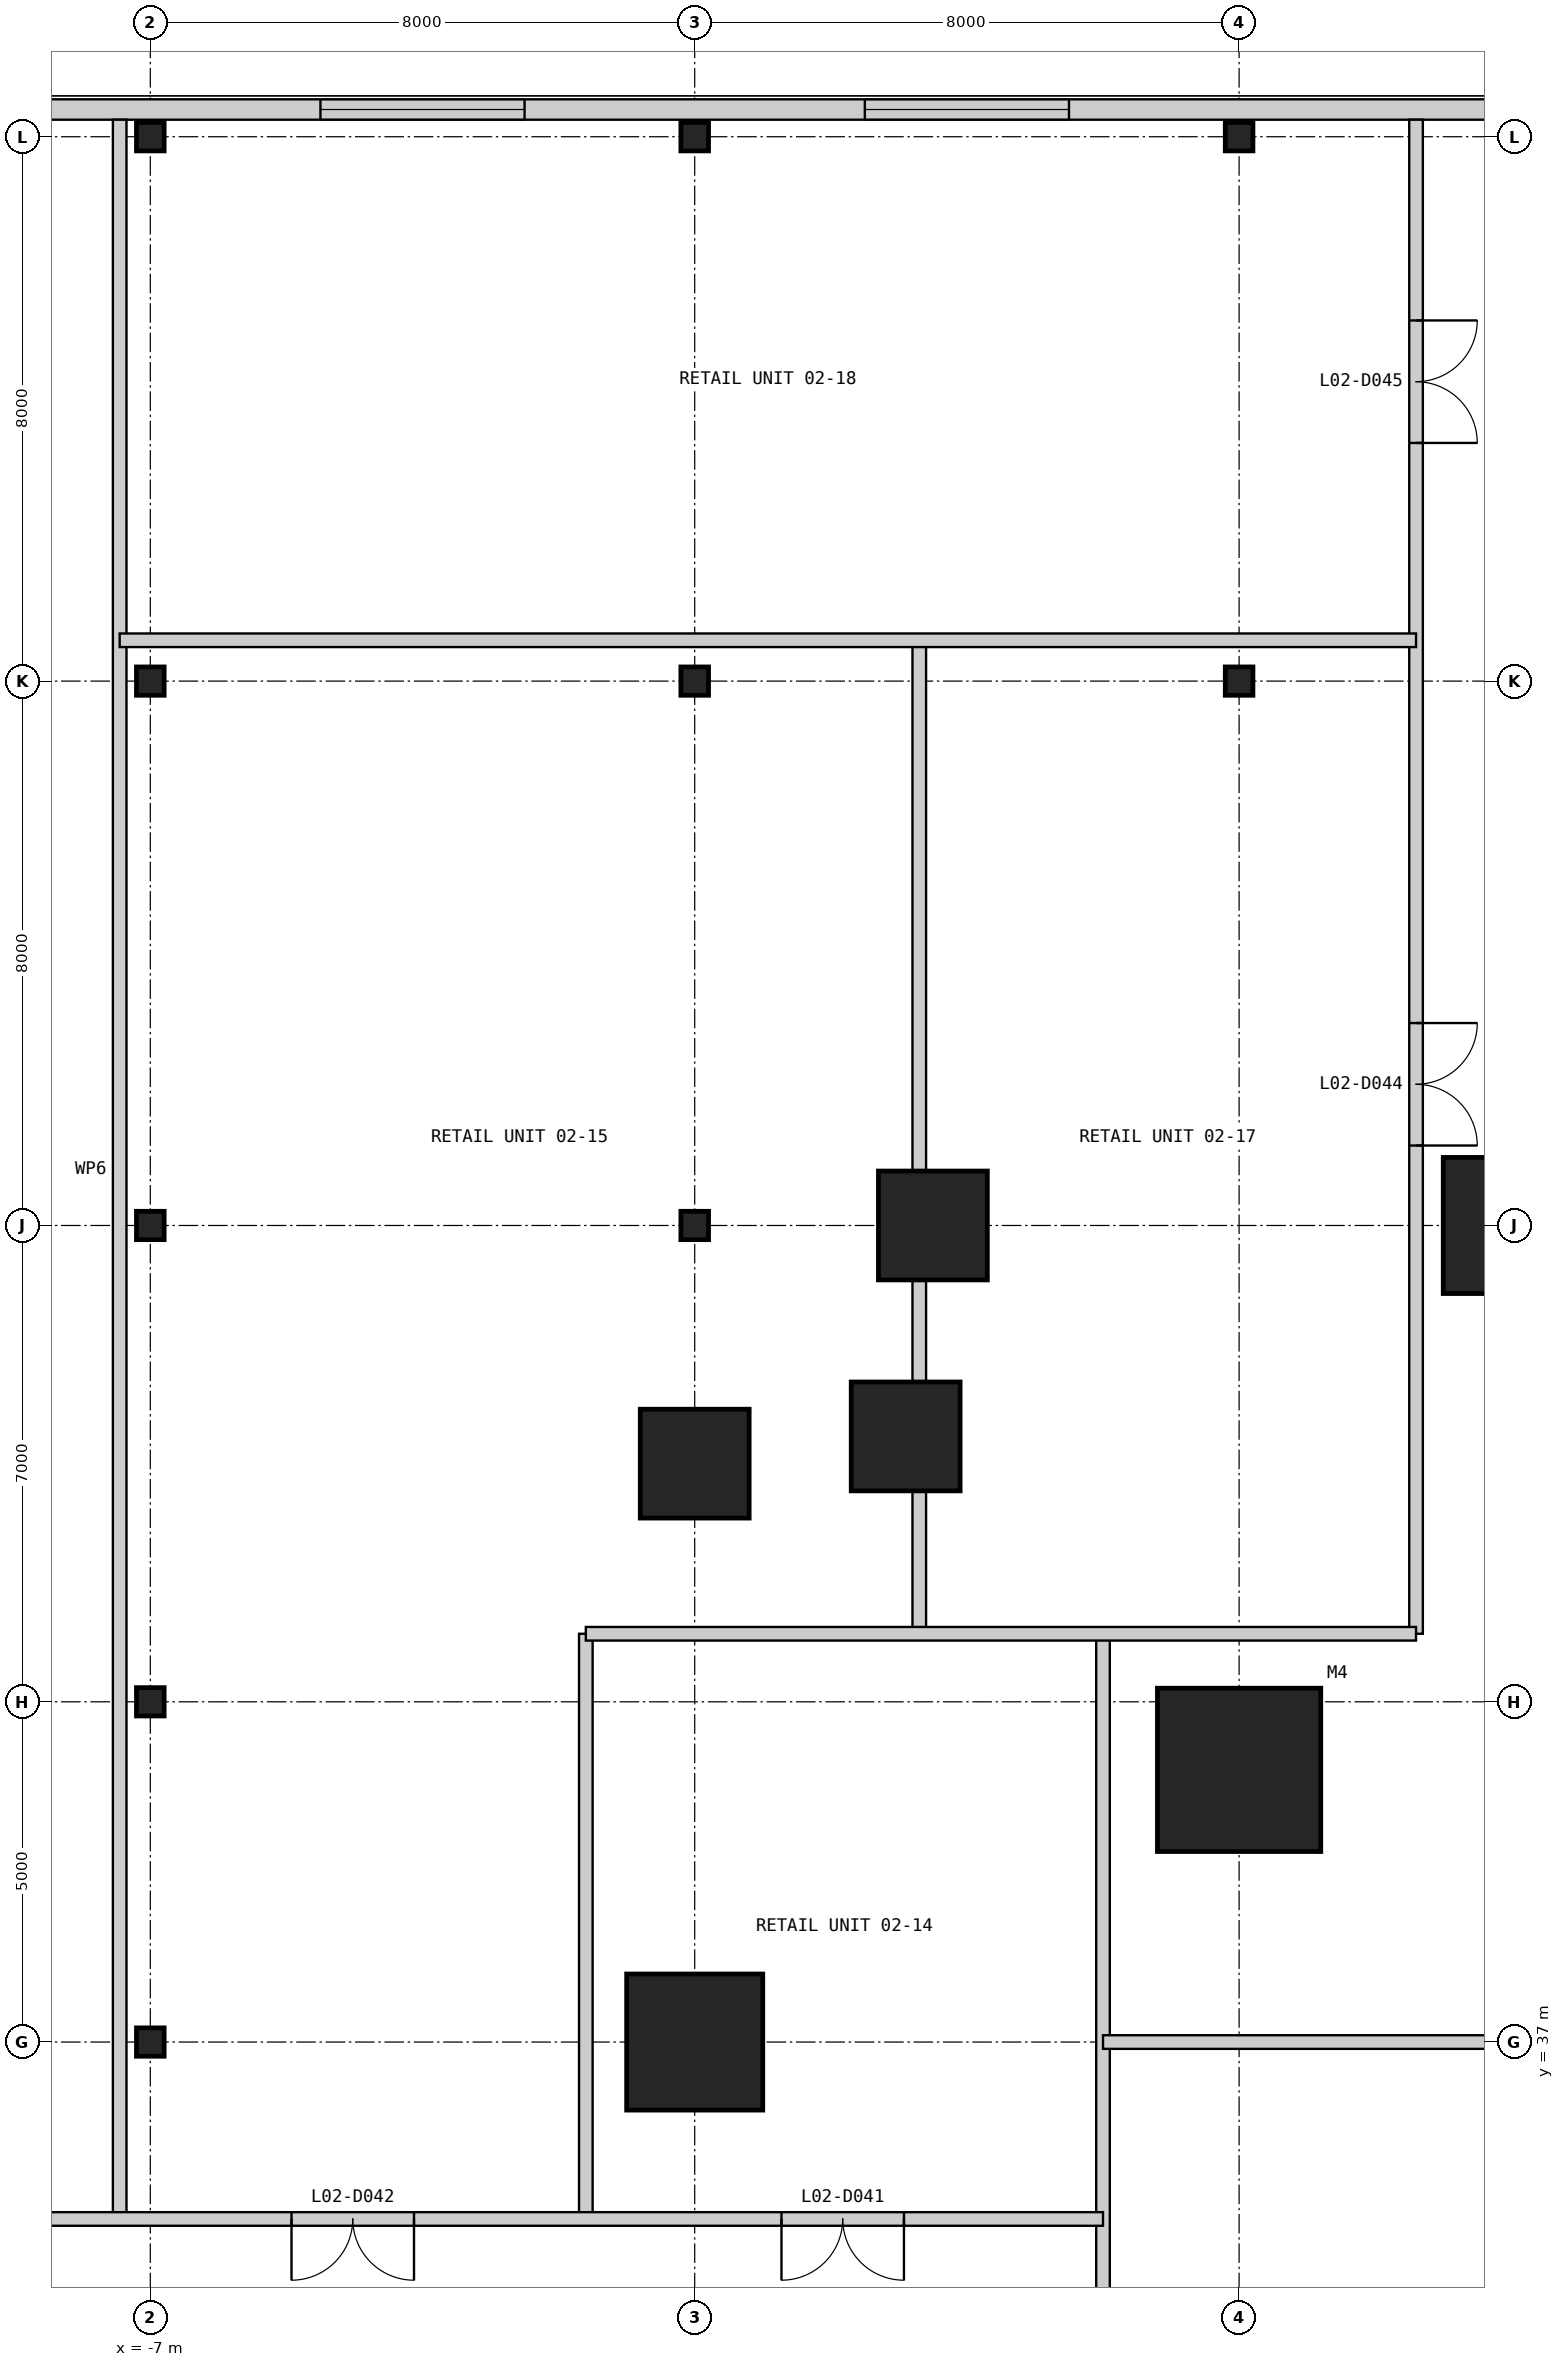
"""IFC4 building model, lengths in metres.
Left out: names, types, materials, properties, quantities, classifications, styles, units other than length and angle.
Written with IfcOpenShell. Run it as: python <this file> out.ifc"""

import sys

from ifc_helpers import new_model, si_unit, direction, frame, frame_2d, origin, origin_2d, place, context, subcontext, project, spatial, rectangle, i_section, extrude, element, fill, save


model = new_model("IFC4")
c1 = context("Model", 3, precision=1e-05, world=origin(), true_north=direction((0.0, 1.0)))
c2 = subcontext(c1, "Body", "Model", "MODEL_VIEW")
j1 = project(units=[si_unit("LENGTHUNIT", "METRE"), si_unit("PLANEANGLEUNIT", "RADIAN")], contexts=[c1])
p1 = place(None, origin())
s1 = spatial("IfcSite", under=j1, at=p1, CompositionType="ELEMENT")
p2 = place(p1, origin())
s2 = spatial("IfcBuilding", under=s1, at=p2, CompositionType="ELEMENT")
p3 = place(p2, frame((0.0, 0.0, 11.8)))
s3 = spatial("IfcBuildingStorey", under=s2, at=p3, CompositionType="ELEMENT", Elevation=11.8)
p4 = place(p3, frame((9.0, 41.0, 0.0), z_axis=(0.0, 0.0, 1.0), x_axis=(1.0, 0.0, 0.0)))
e1 = element("IfcColumn", 1, at=p4, inside=s3, PredefinedType="COLUMN", context=c2, shape_type="SweptSolid", body=[
    extrude(rectangle(XDim=2.4, YDim=2.4, at=origin_2d()), origin(), (0.0, 0.0, 1.0), 4.8),
])
p5 = place(p3, frame((13.0, 49.0, 0.0), z_axis=(0.0, 0.0, 1.0), x_axis=(1.0, 0.0, 0.0)))
e2 = element("IfcColumn", 2, at=p5, inside=s3, PredefinedType="COLUMN", context=c2, shape_type="SweptSolid", body=[
    extrude(rectangle(XDim=2.0, YDim=2.0, at=origin_2d()), origin(), (0.0, 0.0, 1.0), 4.8),
])
for number, where, z_axis, x_axis in (
    (3, (4.5, 49.0, 0.0), (0.0, 0.0, 1.0), (1.0, 0.0, 0.0)),
    (4, (4.1, 45.9, 0.0), (0.0, 0.0, 1.0), (1.0, 0.0, 0.0)),
    (5, (1.0, 45.5, 0.0), (0.0, 0.0, 1.0), (1.0, 0.0, 0.0)),
):
    element("IfcColumn", number, at=place(p3, frame(where, z_axis=z_axis, x_axis=x_axis)), inside=s3, PredefinedType="COLUMN", context=c2, shape_type="SweptSolid", body=[
        extrude(rectangle(XDim=1.6, YDim=1.6, at=origin_2d()), origin(), (0.0, 0.0, 1.0), 4.8),
    ])
p6 = place(p3, frame((1.0, 37.0, 0.0), z_axis=(0.0, 0.0, 1.0), x_axis=(1.0, 0.0, 0.0)))
e6 = element("IfcColumn", 6, at=p6, inside=s3, PredefinedType="COLUMN", context=c2, shape_type="SweptSolid", body=[
    extrude(rectangle(XDim=2.0, YDim=2.0, at=origin_2d()), origin(), (0.0, 0.0, 1.0), 4.8),
])
for number, where, z_axis, x_axis in (
    (7, (-7.0, 37.0, 0.0), (0.0, 0.0, 1.0), (1.0, 0.0, 0.0)),
    (8, (-7.0, 42.0, 0.0), (0.0, 0.0, 1.0), (1.0, 0.0, 0.0)),
    (9, (-7.0, 49.0, 0.0), (0.0, 0.0, 1.0), (1.0, 0.0, 0.0)),
    (10, (-7.0, 57.0, 0.0), (0.0, 0.0, 1.0), (1.0, 0.0, 0.0)),
    (11, (-7.0, 65.0, 0.0), (0.0, 0.0, 1.0), (1.0, 0.0, 0.0)),
    (12, (1.0, 49.0, 0.0), (0.0, 0.0, 1.0), (1.0, 0.0, 0.0)),
    (13, (1.0, 57.0, 0.0), (0.0, 0.0, 1.0), (1.0, 0.0, 0.0)),
    (14, (1.0, 65.0, 0.0), (0.0, 0.0, 1.0), (1.0, 0.0, 0.0)),
    (15, (9.0, 57.0, 0.0), (0.0, 0.0, 1.0), (1.0, 0.0, 0.0)),
    (16, (9.0, 65.0, 0.0), (0.0, 0.0, 1.0), (1.0, 0.0, 0.0)),
):
    element("IfcColumn", number, at=place(p3, frame(where, z_axis=z_axis, x_axis=x_axis)), inside=s3, PredefinedType="COLUMN", context=c2, shape_type="SweptSolid", body=[
        extrude(i_section(OverallWidth=0.406, OverallDepth=0.417, WebThickness=0.03, FlangeThickness=0.048, at=origin_2d()), origin(), (0.0, 0.0, 1.0), 4.8),
    ])
p7 = place(p3, frame((57.55, 65.4, 0.0), z_axis=(0.0, 0.0, 1.0), x_axis=(-1.0, 0.0, 0.0)))
e17 = element("IfcWall", 17, at=p7, inside=s3, PredefinedType="SOLIDWALL", context=c2, shape_type="SweptSolid", body=[
    extrude(rectangle(XDim=73.1, YDim=0.3, at=frame_2d((36.55, 0.0))), origin(), (0.0, 0.0, 1.0), 4.5),
])
p8 = place(p7, frame((67.05, 0.0, 0.9)))
e18 = element("IfcOpeningElement", 18, at=p8, cuts=e17, PredefinedType="OPENING", context=c2, shape_type="SweptSolid", body=[
    extrude(rectangle(XDim=3.0, YDim=2.4, at=frame_2d((1.5, 1.2))), frame((0.0, 0.16, 0.0), z_axis=(0.0, -1.0, 0.0), x_axis=(1.0, 0.0, 0.0)), (0.0, 0.0, 1.0), 0.32),
])
p9 = place(p7, frame((59.05, 0.0, 0.9)))
e19 = element("IfcOpeningElement", 19, at=p9, cuts=e17, PredefinedType="OPENING", context=c2, shape_type="SweptSolid", body=[
    extrude(rectangle(XDim=3.0, YDim=2.4, at=frame_2d((1.5, 1.2))), frame((0.0, 0.16, 0.0), z_axis=(0.0, -1.0, 0.0), x_axis=(1.0, 0.0, 0.0)), (0.0, 0.0, 1.0), 0.32),
])
p10 = place(p7, frame((51.05, 0.0, 0.9)))
e20 = element("IfcOpeningElement", 20, at=p10, cuts=e17, PredefinedType="OPENING", context=c2, shape_type="SweptSolid", body=[
    extrude(rectangle(XDim=3.0, YDim=2.4, at=frame_2d((1.5, 1.2))), frame((0.0, 0.16, 0.0), z_axis=(0.0, -1.0, 0.0), x_axis=(1.0, 0.0, 0.0)), (0.0, 0.0, 1.0), 0.32),
])
p11 = place(p7, frame((37.05, 0.0, 0.9)))
e21 = element("IfcOpeningElement", 21, at=p11, cuts=e17, PredefinedType="OPENING", context=c2, shape_type="SweptSolid", body=[
    extrude(rectangle(XDim=3.0, YDim=2.4, at=frame_2d((1.5, 1.2))), frame((0.0, 0.16, 0.0), z_axis=(0.0, -1.0, 0.0), x_axis=(1.0, 0.0, 0.0)), (0.0, 0.0, 1.0), 0.32),
])
p12 = place(p7, frame((25.05, 0.0, 0.9)))
e22 = element("IfcOpeningElement", 22, at=p12, cuts=e17, PredefinedType="OPENING", context=c2, shape_type="SweptSolid", body=[
    extrude(rectangle(XDim=3.0, YDim=2.4, at=frame_2d((1.5, 1.2))), frame((0.0, 0.16, 0.0), z_axis=(0.0, -1.0, 0.0), x_axis=(1.0, 0.0, 0.0)), (0.0, 0.0, 1.0), 0.32),
])
p13 = place(p7, frame((16.55, 0.0, 0.9)))
e23 = element("IfcOpeningElement", 23, at=p13, cuts=e17, PredefinedType="OPENING", context=c2, shape_type="SweptSolid", body=[
    extrude(rectangle(XDim=3.0, YDim=2.4, at=frame_2d((1.5, 1.2))), frame((0.0, 0.16, 0.0), z_axis=(0.0, -1.0, 0.0), x_axis=(1.0, 0.0, 0.0)), (0.0, 0.0, 1.0), 0.32),
])
p14 = place(p7, frame((10.55, 0.0, 0.9)))
e24 = element("IfcOpeningElement", 24, at=p14, cuts=e17, PredefinedType="OPENING", context=c2, shape_type="SweptSolid", body=[
    extrude(rectangle(XDim=3.0, YDim=2.4, at=frame_2d((1.5, 1.2))), frame((0.0, 0.16, 0.0), z_axis=(0.0, -1.0, 0.0), x_axis=(1.0, 0.0, 0.0)), (0.0, 0.0, 1.0), 0.32),
])
p15 = place(p7, frame((3.05, 0.0, 0.9)))
e25 = element("IfcOpeningElement", 25, at=p15, cuts=e17, PredefinedType="OPENING", context=c2, shape_type="SweptSolid", body=[
    extrude(rectangle(XDim=3.0, YDim=2.4, at=frame_2d((1.5, 1.2))), frame((0.0, 0.16, 0.0), z_axis=(0.0, -1.0, 0.0), x_axis=(1.0, 0.0, 0.0)), (0.0, 0.0, 1.0), 0.32),
])
p16 = place(p3, frame((-7.45, 34.4, 0.0), z_axis=(0.0, 0.0, 1.0), x_axis=(0.0, 1.0, 0.0)))
e26 = element("IfcWall", 26, at=p16, inside=s3, PredefinedType="PARTITIONING", context=c2, shape_type="SweptSolid", body=[
    extrude(rectangle(XDim=30.85, YDim=0.2, at=frame_2d((15.425, 0.0))), origin(), (0.0, 0.0, 1.0), 4.5),
])
p17 = place(p3, frame((-0.6, 34.4, 0.0), z_axis=(0.0, 0.0, 1.0), x_axis=(0.0, 1.0, 0.0)))
e27 = element("IfcWall", 27, at=p17, inside=s3, PredefinedType="PARTITIONING", context=c2, shape_type="SweptSolid", body=[
    extrude(rectangle(XDim=8.6, YDim=0.2, at=frame_2d((4.3, 0.0))), origin(), (0.0, 0.0, 1.0), 4.5),
])
p18 = place(p3, frame((4.3, 43.0, 0.0), z_axis=(0.0, 0.0, 1.0), x_axis=(0.0, 1.0, 0.0)))
e28 = element("IfcWall", 28, at=p18, inside=s3, PredefinedType="PARTITIONING", context=c2, shape_type="SweptSolid", body=[
    extrude(rectangle(XDim=2.1, YDim=0.2, at=frame_2d((1.05, 0.0))), origin(), (0.0, 0.0, 1.0), 4.5),
])
p19 = place(p3, frame((4.3, 46.7, 0.0), z_axis=(0.0, 0.0, 1.0), x_axis=(0.0, 1.0, 0.0)))
e29 = element("IfcWall", 29, at=p19, inside=s3, PredefinedType="PARTITIONING", context=c2, shape_type="SweptSolid", body=[
    extrude(rectangle(XDim=1.5, YDim=0.2, at=frame_2d((0.75, 0.0))), origin(), (0.0, 0.0, 1.0), 3.65),
])
p20 = place(p3, frame((4.3, 49.8, 0.0), z_axis=(0.0, 0.0, 1.0), x_axis=(0.0, 1.0, 0.0)))
e30 = element("IfcWall", 30, at=p20, inside=s3, PredefinedType="PARTITIONING", context=c2, shape_type="SweptSolid", body=[
    extrude(rectangle(XDim=7.8, YDim=0.2, at=frame_2d((3.9, 0.0))), origin(), (0.0, 0.0, 1.0), 4.5),
])
p21 = place(p3, frame((7.0, 22.0, 0.0), z_axis=(0.0, 0.0, 1.0), x_axis=(0.0, 1.0, 0.0)))
e31 = element("IfcWall", 31, at=p21, inside=s3, PredefinedType="PARTITIONING", context=c2, shape_type="SweptSolid", body=[
    extrude(rectangle(XDim=21.0, YDim=0.2, at=frame_2d((10.5, 0.0))), origin(), (0.0, 0.0, 1.0), 3.843),
])
p22 = place(p3, frame((11.6, 43.0, 0.0), z_axis=(0.0, 0.0, 1.0), x_axis=(0.0, 1.0, 0.0)))
e32 = element("IfcWall", 32, at=p22, inside=s3, PredefinedType="PARTITIONING", context=c2, shape_type="SweptSolid", body=[
    extrude(rectangle(XDim=22.25, YDim=0.2, at=frame_2d((11.125, 0.0))), origin(), (0.0, 0.0, 1.0), 4.5),
])
p23 = place(p22, frame((7.175, 0.0, 0.0)))
e33 = element("IfcOpeningElement", 33, at=p23, cuts=e32, PredefinedType="OPENING", context=c2, shape_type="SweptSolid", body=[
    extrude(rectangle(XDim=1.8, YDim=2.4, at=frame_2d((0.9, 1.2))), frame((0.0, 0.11, 0.0), z_axis=(0.0, -1.0, 0.0), x_axis=(1.0, 0.0, 0.0)), (0.0, 0.0, 1.0), 0.22),
])
p24 = place(p22, frame((17.5, 0.0, 0.0)))
e34 = element("IfcOpeningElement", 34, at=p24, cuts=e32, PredefinedType="OPENING", context=c2, shape_type="SweptSolid", body=[
    extrude(rectangle(XDim=1.8, YDim=2.4, at=frame_2d((0.9, 1.2))), frame((0.0, 0.11, 0.0), z_axis=(0.0, -1.0, 0.0), x_axis=(1.0, 0.0, 0.0)), (0.0, 0.0, 1.0), 0.22),
])
p25 = place(p3, frame((-15.25, 34.4, 0.0), z_axis=(0.0, 0.0, 1.0), x_axis=(1.0, 0.0, 0.0)))
e35 = element("IfcWall", 35, at=p25, inside=s3, PredefinedType="PARTITIONING", context=c2, shape_type="SweptSolid", body=[
    extrude(rectangle(XDim=22.25, YDim=0.2, at=frame_2d((11.125, 0.0))), origin(), (0.0, 0.0, 1.0), 4.5),
])
p26 = place(p25, frame((17.525, 0.0, 0.0)))
e36 = element("IfcOpeningElement", 36, at=p26, cuts=e35, PredefinedType="OPENING", context=c2, shape_type="SweptSolid", body=[
    extrude(rectangle(XDim=1.8, YDim=2.4, at=frame_2d((0.9, 1.2))), frame((0.0, 0.11, 0.0), z_axis=(0.0, -1.0, 0.0), x_axis=(1.0, 0.0, 0.0)), (0.0, 0.0, 1.0), 0.22),
])
p27 = place(p25, frame((10.325, 0.0, 0.0)))
e37 = element("IfcOpeningElement", 37, at=p27, cuts=e35, PredefinedType="OPENING", context=c2, shape_type="SweptSolid", body=[
    extrude(rectangle(XDim=1.8, YDim=2.4, at=frame_2d((0.9, 1.2))), frame((0.0, 0.11, 0.0), z_axis=(0.0, -1.0, 0.0), x_axis=(1.0, 0.0, 0.0)), (0.0, 0.0, 1.0), 0.22),
])
p28 = place(p25, frame((3.025, 0.0, 0.0)))
e38 = element("IfcOpeningElement", 38, at=p28, cuts=e35, PredefinedType="OPENING", context=c2, shape_type="SweptSolid", body=[
    extrude(rectangle(XDim=1.8, YDim=2.4, at=frame_2d((0.9, 1.2))), frame((0.0, 0.11, 0.0), z_axis=(0.0, -1.0, 0.0), x_axis=(1.0, 0.0, 0.0)), (0.0, 0.0, 1.0), 0.22),
])
p29 = place(p3, frame((7.0, 37.0, 0.0), z_axis=(0.0, 0.0, 1.0), x_axis=(1.0, 0.0, 0.0)))
e39 = element("IfcWall", 39, at=p29, inside=s3, PredefinedType="PARTITIONING", context=c2, shape_type="SweptSolid", body=[
    extrude(rectangle(XDim=6.0, YDim=0.2, at=frame_2d((3.0, 0.0))), origin(), (0.0, 0.0, 1.0), 3.653),
])
p30 = place(p3, frame((-0.6, 43.0, 0.0), z_axis=(0.0, 0.0, 1.0), x_axis=(1.0, 0.0, 0.0)))
e40 = element("IfcWall", 40, at=p30, inside=s3, PredefinedType="PARTITIONING", context=c2, shape_type="SweptSolid", body=[
    extrude(rectangle(XDim=12.2, YDim=0.2, at=frame_2d((6.1, 0.0))), origin(), (0.0, 0.0, 1.0), 4.5),
])
p31 = place(p3, frame((-7.45, 57.6, 0.0), z_axis=(0.0, 0.0, 1.0), x_axis=(1.0, 0.0, 0.0)))
e41 = element("IfcWall", 41, at=p31, inside=s3, PredefinedType="PARTITIONING", context=c2, shape_type="SweptSolid", body=[
    extrude(rectangle(XDim=19.05, YDim=0.2, at=frame_2d((9.525, 0.0))), origin(), (0.0, 0.0, 1.0), 4.5),
])
p32 = place(p9, origin())
e42 = element("IfcWindow", 42, at=p32, inside=s3, PartitioningType="SINGLE_PANEL", PredefinedType="WINDOW", context=c2, shape_type="SweptSolid", body=[
    extrude(rectangle(XDim=3.0, YDim=2.4, at=frame_2d((1.5, 1.2))), frame((0.0, 0.03, 0.0), z_axis=(0.0, -1.0, 0.0), x_axis=(1.0, 0.0, 0.0)), (0.0, 0.0, 1.0), 0.06),
])
fill(e19, e42)
p33 = place(p10, origin())
e43 = element("IfcWindow", 43, at=p33, inside=s3, PartitioningType="SINGLE_PANEL", PredefinedType="WINDOW", context=c2, shape_type="SweptSolid", body=[
    extrude(rectangle(XDim=3.0, YDim=2.4, at=frame_2d((1.5, 1.2))), frame((0.0, 0.03, 0.0), z_axis=(0.0, -1.0, 0.0), x_axis=(1.0, 0.0, 0.0)), (0.0, 0.0, 1.0), 0.06),
])
fill(e20, e43)
p34 = place(p26, frame((1.8, 0.0, 0.0), z_axis=(0.0, 0.0, 1.0), x_axis=(-1.0, 0.0, 0.0)))
e44 = element("IfcDoor", 44, at=p34, inside=s3, OperationType="DOUBLE_DOOR_SINGLE_SWING", PredefinedType="DOOR", context=c2, shape_type="SweptSolid", body=[
    extrude(rectangle(XDim=1.8, YDim=2.4, at=frame_2d((0.9, 1.2))), frame((0.0, 0.025, 0.0), z_axis=(0.0, -1.0, 0.0), x_axis=(1.0, 0.0, 0.0)), (0.0, 0.0, 1.0), 0.05),
])
fill(e36, e44)
p35 = place(p27, frame((1.8, 0.0, 0.0), z_axis=(0.0, 0.0, 1.0), x_axis=(-1.0, 0.0, 0.0)))
e45 = element("IfcDoor", 45, at=p35, inside=s3, OperationType="DOUBLE_DOOR_SINGLE_SWING", PredefinedType="DOOR", context=c2, shape_type="SweptSolid", body=[
    extrude(rectangle(XDim=1.8, YDim=2.4, at=frame_2d((0.9, 1.2))), frame((0.0, 0.025, 0.0), z_axis=(0.0, -1.0, 0.0), x_axis=(1.0, 0.0, 0.0)), (0.0, 0.0, 1.0), 0.05),
])
fill(e37, e45)
p36 = place(p23, frame((1.8, 0.0, 0.0), z_axis=(0.0, 0.0, 1.0), x_axis=(-1.0, 0.0, 0.0)))
e46 = element("IfcDoor", 46, at=p36, inside=s3, OperationType="DOUBLE_DOOR_SINGLE_SWING", PredefinedType="DOOR", context=c2, shape_type="SweptSolid", body=[
    extrude(rectangle(XDim=1.8, YDim=2.4, at=frame_2d((0.9, 1.2))), frame((0.0, 0.025, 0.0), z_axis=(0.0, -1.0, 0.0), x_axis=(1.0, 0.0, 0.0)), (0.0, 0.0, 1.0), 0.05),
])
fill(e33, e46)
p37 = place(p24, frame((1.8, 0.0, 0.0), z_axis=(0.0, 0.0, 1.0), x_axis=(-1.0, 0.0, 0.0)))
e47 = element("IfcDoor", 47, at=p37, inside=s3, OperationType="DOUBLE_DOOR_SINGLE_SWING", PredefinedType="DOOR", context=c2, shape_type="SweptSolid", body=[
    extrude(rectangle(XDim=1.8, YDim=2.4, at=frame_2d((0.9, 1.2))), frame((0.0, 0.025, 0.0), z_axis=(0.0, -1.0, 0.0), x_axis=(1.0, 0.0, 0.0)), (0.0, 0.0, 1.0), 0.05),
])
fill(e34, e47)
save(model, sys.argv[1])
